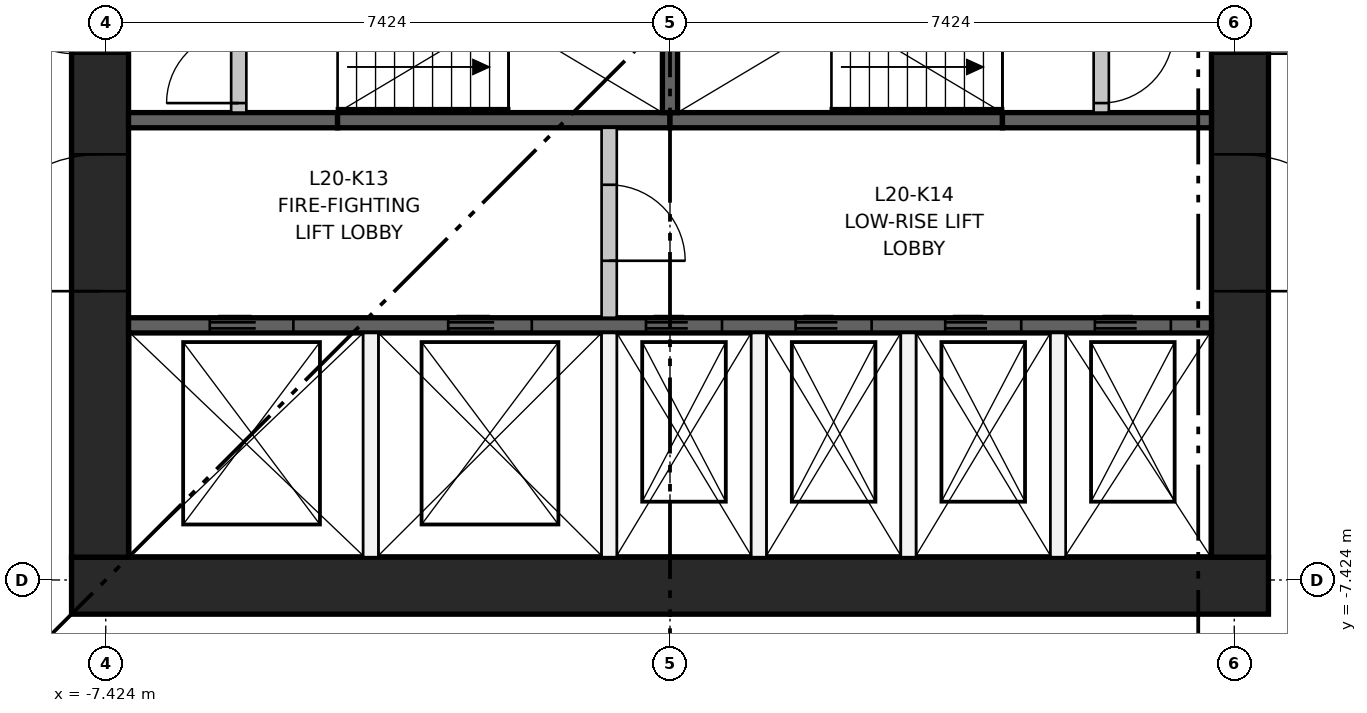
"""IFC4 building model, lengths in metres.
Left out: names, types, materials, properties, quantities, classifications, styles, units other than length and angle.
Written with IfcOpenShell. Run it as: python <this file> out.ifc"""

import sys

from ifc_helpers import new_model, si_unit, direction, frame, frame_2d, origin, place, context, subcontext, project, spatial, rectangle, extrude, element, fill, save


model = new_model("IFC4")
c1 = context("Model", 3, precision=1e-05, world=origin(), true_north=direction((0.0, 1.0)))
c2 = subcontext(c1, "Body", "Model", "MODEL_VIEW")
j1 = project(units=[si_unit("LENGTHUNIT", "METRE"), si_unit("PLANEANGLEUNIT", "RADIAN")], contexts=[c1])
p1 = place(None, origin())
s1 = spatial("IfcSite", under=j1, at=p1, CompositionType="ELEMENT")
p2 = place(p1, origin())
s2 = spatial("IfcBuilding", under=s1, at=p2, CompositionType="ELEMENT")
p3 = place(p2, frame((0.0, 0.0, 80.05)))
s3 = spatial("IfcBuildingStorey", under=s2, at=p3, CompositionType="ELEMENT", Elevation=80.05)
p4 = place(p3, frame((-7.874, -7.499, 0.0), z_axis=(0.0, 0.0, 1.0), x_axis=(1.0, 0.0, 0.0)))
e1 = element("IfcWall", 1, at=p4, inside=s3, PredefinedType="SHEAR", context=c2, shape_type="SweptSolid", body=[
    extrude(rectangle(XDim=15.748, YDim=0.75, at=frame_2d((7.874, 0.0))), origin(), (0.0, 0.0, 1.0), 3.65),
])
p5 = place(p3, frame((-7.499, -7.124, 0.0), z_axis=(0.0, 0.0, 1.0), x_axis=(0.0, 1.0, 0.0)))
e2 = element("IfcWall", 2, at=p5, inside=s3, PredefinedType="SHEAR", context=c2, shape_type="SweptSolid", body=[
    extrude(rectangle(XDim=14.248, YDim=0.75, at=frame_2d((7.124, 0.0))), origin(), (0.0, 0.0, 1.0), 3.65),
])
p6 = place(p5, frame((6.624, 0.0, 0.0)))
e3 = element("IfcOpeningElement", 3, at=p6, cuts=e2, PredefinedType="OPENING", context=c2, shape_type="SweptSolid", body=[
    extrude(rectangle(XDim=1.0, YDim=2.1, at=frame_2d((0.5, 1.05))), frame((0.0, 0.385, 0.0), z_axis=(0.0, -1.0, 0.0), x_axis=(1.0, 0.0, 0.0)), (0.0, 0.0, 1.0), 0.77),
])
p7 = place(p5, frame((3.5, 0.0, 0.0)))
e4 = element("IfcOpeningElement", 4, at=p7, cuts=e2, PredefinedType="OPENING", context=c2, shape_type="SweptSolid", body=[
    extrude(rectangle(XDim=1.8, YDim=2.1, at=frame_2d((0.9, 1.05))), frame((0.0, 0.385, 0.0), z_axis=(0.0, -1.0, 0.0), x_axis=(1.0, 0.0, 0.0)), (0.0, 0.0, 1.0), 0.77),
])
p8 = place(p5, frame((8.948, 0.0, 0.0)))
e5 = element("IfcOpeningElement", 5, at=p8, cuts=e2, PredefinedType="OPENING", context=c2, shape_type="SweptSolid", body=[
    extrude(rectangle(XDim=1.8, YDim=2.1, at=frame_2d((0.9, 1.05))), frame((0.0, 0.385, 0.0), z_axis=(0.0, -1.0, 0.0), x_axis=(1.0, 0.0, 0.0)), (0.0, 0.0, 1.0), 0.77),
])
p9 = place(p5, frame((12.124, 0.0, 0.0)))
e6 = element("IfcOpeningElement", 6, at=p9, cuts=e2, PredefinedType="OPENING", context=c2, shape_type="SweptSolid", body=[
    extrude(rectangle(XDim=1.0, YDim=2.1, at=frame_2d((0.5, 1.05))), frame((0.0, 0.385, 0.0), z_axis=(0.0, -1.0, 0.0), x_axis=(1.0, 0.0, 0.0)), (0.0, 0.0, 1.0), 0.77),
])
p10 = place(p3, frame((7.499, -7.124, 0.0), z_axis=(0.0, 0.0, 1.0), x_axis=(0.0, 1.0, 0.0)))
e7 = element("IfcWall", 7, at=p10, inside=s3, PredefinedType="SHEAR", context=c2, shape_type="SweptSolid", body=[
    extrude(rectangle(XDim=14.248, YDim=0.75, at=frame_2d((7.124, 0.0))), origin(), (0.0, 0.0, 1.0), 3.65),
])
p11 = place(p10, frame((6.624, 0.0, 0.0)))
e8 = element("IfcOpeningElement", 8, at=p11, cuts=e7, PredefinedType="OPENING", context=c2, shape_type="SweptSolid", body=[
    extrude(rectangle(XDim=1.0, YDim=2.1, at=frame_2d((0.5, 1.05))), frame((0.0, 0.385, 0.0), z_axis=(0.0, -1.0, 0.0), x_axis=(1.0, 0.0, 0.0)), (0.0, 0.0, 1.0), 0.77),
])
p12 = place(p10, frame((3.5, 0.0, 0.0)))
e9 = element("IfcOpeningElement", 9, at=p12, cuts=e7, PredefinedType="OPENING", context=c2, shape_type="SweptSolid", body=[
    extrude(rectangle(XDim=1.8, YDim=2.1, at=frame_2d((0.9, 1.05))), frame((0.0, 0.385, 0.0), z_axis=(0.0, -1.0, 0.0), x_axis=(1.0, 0.0, 0.0)), (0.0, 0.0, 1.0), 0.77),
])
p13 = place(p10, frame((8.948, 0.0, 0.0)))
e10 = element("IfcOpeningElement", 10, at=p13, cuts=e7, PredefinedType="OPENING", context=c2, shape_type="SweptSolid", body=[
    extrude(rectangle(XDim=1.8, YDim=2.1, at=frame_2d((0.9, 1.05))), frame((0.0, 0.385, 0.0), z_axis=(0.0, -1.0, 0.0), x_axis=(1.0, 0.0, 0.0)), (0.0, 0.0, 1.0), 0.77),
])
p14 = place(p3, frame((-7.124, -4.074, 0.0), z_axis=(0.0, 0.0, 1.0), x_axis=(1.0, 0.0, 0.0)))
e11 = element("IfcWall", 11, at=p14, inside=s3, PredefinedType="SHEAR", context=c2, shape_type="SweptSolid", body=[
    extrude(rectangle(XDim=14.248, YDim=0.2, at=frame_2d((7.124, 0.0))), origin(), (0.0, 0.0, 1.0), 3.3),
])
p15 = place(p14, frame((1.069, 0.0, 0.0)))
e12 = element("IfcOpeningElement", 12, at=p15, cuts=e11, PredefinedType="OPENING", context=c2, shape_type="SweptSolid", body=[
    extrude(rectangle(XDim=1.1, YDim=2.1, at=frame_2d((0.55, 1.05))), frame((0.0, 0.11, 0.0), z_axis=(0.0, -1.0, 0.0), x_axis=(1.0, 0.0, 0.0)), (0.0, 0.0, 1.0), 0.22),
])
p16 = place(p14, frame((4.206, 0.0, 0.0)))
e13 = element("IfcOpeningElement", 13, at=p16, cuts=e11, PredefinedType="OPENING", context=c2, shape_type="SweptSolid", body=[
    extrude(rectangle(XDim=1.1, YDim=2.1, at=frame_2d((0.55, 1.05))), frame((0.0, 0.11, 0.0), z_axis=(0.0, -1.0, 0.0), x_axis=(1.0, 0.0, 0.0)), (0.0, 0.0, 1.0), 0.22),
])
p17 = place(p14, frame((6.808, 0.0, 0.0)))
e14 = element("IfcOpeningElement", 14, at=p17, cuts=e11, PredefinedType="OPENING", context=c2, shape_type="SweptSolid", body=[
    extrude(rectangle(XDim=1.0, YDim=2.1, at=frame_2d((0.5, 1.05))), frame((0.0, 0.11, 0.0), z_axis=(0.0, -1.0, 0.0), x_axis=(1.0, 0.0, 0.0)), (0.0, 0.0, 1.0), 0.22),
])
p18 = place(p14, frame((8.777, 0.0, 0.0)))
e15 = element("IfcOpeningElement", 15, at=p18, cuts=e11, PredefinedType="OPENING", context=c2, shape_type="SweptSolid", body=[
    extrude(rectangle(XDim=1.0, YDim=2.1, at=frame_2d((0.5, 1.05))), frame((0.0, 0.11, 0.0), z_axis=(0.0, -1.0, 0.0), x_axis=(1.0, 0.0, 0.0)), (0.0, 0.0, 1.0), 0.22),
])
p19 = place(p14, frame((10.745, 0.0, 0.0)))
e16 = element("IfcOpeningElement", 16, at=p19, cuts=e11, PredefinedType="OPENING", context=c2, shape_type="SweptSolid", body=[
    extrude(rectangle(XDim=1.0, YDim=2.1, at=frame_2d((0.5, 1.05))), frame((0.0, 0.11, 0.0), z_axis=(0.0, -1.0, 0.0), x_axis=(1.0, 0.0, 0.0)), (0.0, 0.0, 1.0), 0.22),
])
p20 = place(p14, frame((12.714, 0.0, 0.0)))
e17 = element("IfcOpeningElement", 17, at=p20, cuts=e11, PredefinedType="OPENING", context=c2, shape_type="SweptSolid", body=[
    extrude(rectangle(XDim=1.0, YDim=2.1, at=frame_2d((0.5, 1.05))), frame((0.0, 0.11, 0.0), z_axis=(0.0, -1.0, 0.0), x_axis=(1.0, 0.0, 0.0)), (0.0, 0.0, 1.0), 0.22),
])
p21 = place(p3, frame((-7.124, -1.375, 0.0), z_axis=(0.0, 0.0, 1.0), x_axis=(1.0, 0.0, 0.0)))
e18 = element("IfcWall", 18, at=p21, inside=s3, PredefinedType="SHEAR", context=c2, shape_type="SweptSolid", body=[
    extrude(rectangle(XDim=2.75, YDim=0.2, at=frame_2d((1.375, 0.0))), origin(), (0.0, 0.0, 1.0), 3.3),
])
for number, where, z_axis, x_axis in (
    (19, (-4.374, -1.375, 0.0), (0.0, 0.0, 1.0), (1.0, 0.0, 0.0)),
    (20, (0.0, -1.375, 0.0), (0.0, 0.0, 1.0), (1.0, 0.0, 0.0)),
):
    element("IfcWall", number, at=place(p3, frame(where, z_axis=z_axis, x_axis=x_axis)), inside=s3, PredefinedType="SHEAR", context=c2, shape_type="SweptSolid", body=[
        extrude(rectangle(XDim=4.374, YDim=0.2, at=frame_2d((2.187, 0.0))), origin(), (0.0, 0.0, 1.0), 3.3),
    ])
p22 = place(p3, frame((4.374, -1.375, 0.0), z_axis=(0.0, 0.0, 1.0), x_axis=(1.0, 0.0, 0.0)))
e21 = element("IfcWall", 21, at=p22, inside=s3, PredefinedType="SHEAR", context=c2, shape_type="SweptSolid", body=[
    extrude(rectangle(XDim=2.75, YDim=0.2, at=frame_2d((1.375, 0.0))), origin(), (0.0, 0.0, 1.0), 3.3),
])
p23 = place(p3, frame((0.0, -1.275, 0.0), z_axis=(0.0, 0.0, 1.0), x_axis=(0.0, 1.0, 0.0)))
e22 = element("IfcWall", 22, at=p23, inside=s3, PredefinedType="SHEAR", context=c2, shape_type="SweptSolid", body=[
    extrude(rectangle(XDim=2.55, YDim=0.2, at=frame_2d((1.275, 0.0))), origin(), (0.0, 0.0, 1.0), 3.3),
])
for number, where, z_axis, x_axis in (
    (23, (-3.937, -7.124, 0.0), (0.0, 0.0, 1.0), (0.0, 1.0, 0.0)),
    (24, (-0.8, -7.124, 0.0), (0.0, 0.0, 1.0), (0.0, 1.0, 0.0)),
):
    element("IfcWall", number, at=place(p3, frame(where, z_axis=z_axis, x_axis=x_axis)), inside=s3, PredefinedType="PARTITIONING", context=c2, shape_type="SweptSolid", body=[
        extrude(rectangle(XDim=2.95, YDim=0.2, at=frame_2d((1.475, 0.0))), origin(), (0.0, 0.0, 1.0), 3.3),
    ])
p24 = place(p3, frame((-0.8, -3.974, 0.0), z_axis=(0.0, 0.0, 1.0), x_axis=(0.0, 1.0, 0.0)))
e25 = element("IfcWall", 25, at=p24, inside=s3, PredefinedType="PARTITIONING", context=c2, shape_type="SweptSolid", body=[
    extrude(rectangle(XDim=2.499, YDim=0.2, at=frame_2d((1.25, 0.0))), origin(), (0.0, 0.0, 1.0), 3.3),
])
p25 = place(p24, frame((0.75, 0.0, 0.0)))
e26 = element("IfcOpeningElement", 26, at=p25, cuts=e25, PredefinedType="OPENING", context=c2, shape_type="SweptSolid", body=[
    extrude(rectangle(XDim=1.0, YDim=2.1, at=frame_2d((0.5, 1.05))), frame((0.0, 0.11, 0.0), z_axis=(0.0, -1.0, 0.0), x_axis=(1.0, 0.0, 0.0)), (0.0, 0.0, 1.0), 0.22),
])
for number, where, z_axis, x_axis in (
    (27, (1.168, -7.124, 0.0), (0.0, 0.0, 1.0), (0.0, 1.0, 0.0)),
    (28, (3.137, -7.124, 0.0), (0.0, 0.0, 1.0), (0.0, 1.0, 0.0)),
    (29, (5.105, -7.124, 0.0), (0.0, 0.0, 1.0), (0.0, 1.0, 0.0)),
):
    element("IfcWall", number, at=place(p3, frame(where, z_axis=z_axis, x_axis=x_axis)), inside=s3, PredefinedType="PARTITIONING", context=c2, shape_type="SweptSolid", body=[
        extrude(rectangle(XDim=2.95, YDim=0.2, at=frame_2d((1.475, 0.0))), origin(), (0.0, 0.0, 1.0), 3.3),
    ])
p26 = place(p3, frame((-5.674, -1.275, 0.0), z_axis=(0.0, 0.0, 1.0), x_axis=(0.0, 1.0, 0.0)))
e30 = element("IfcWall", 30, at=p26, inside=s3, PredefinedType="PARTITIONING", context=c2, shape_type="SweptSolid", body=[
    extrude(rectangle(XDim=2.55, YDim=0.2, at=frame_2d((1.275, 0.0))), origin(), (0.0, 0.0, 1.0), 3.3),
])
p27 = place(p26, frame((0.125, 0.0, 0.0)))
e31 = element("IfcOpeningElement", 31, at=p27, cuts=e30, PredefinedType="OPENING", context=c2, shape_type="SweptSolid", body=[
    extrude(rectangle(XDim=0.95, YDim=2.1, at=frame_2d((0.475, 1.05))), frame((0.0, 0.11, 0.0), z_axis=(0.0, -1.0, 0.0), x_axis=(1.0, 0.0, 0.0)), (0.0, 0.0, 1.0), 0.22),
])
p28 = place(p26, frame((1.475, 0.0, 0.0)))
e32 = element("IfcOpeningElement", 32, at=p28, cuts=e30, PredefinedType="OPENING", context=c2, shape_type="SweptSolid", body=[
    extrude(rectangle(XDim=0.95, YDim=2.1, at=frame_2d((0.475, 1.05))), frame((0.0, 0.11, 0.0), z_axis=(0.0, -1.0, 0.0), x_axis=(1.0, 0.0, 0.0)), (0.0, 0.0, 1.0), 0.22),
])
p29 = place(p3, frame((5.674, -1.275, 0.0), z_axis=(0.0, 0.0, 1.0), x_axis=(0.0, 1.0, 0.0)))
e33 = element("IfcWall", 33, at=p29, inside=s3, PredefinedType="PARTITIONING", context=c2, shape_type="SweptSolid", body=[
    extrude(rectangle(XDim=2.55, YDim=0.2, at=frame_2d((1.275, 0.0))), origin(), (0.0, 0.0, 1.0), 3.3),
])
p30 = place(p29, frame((0.125, 0.0, 0.0)))
e34 = element("IfcOpeningElement", 34, at=p30, cuts=e33, PredefinedType="OPENING", context=c2, shape_type="SweptSolid", body=[
    extrude(rectangle(XDim=0.95, YDim=2.1, at=frame_2d((0.475, 1.05))), frame((0.0, 0.11, 0.0), z_axis=(0.0, -1.0, 0.0), x_axis=(1.0, 0.0, 0.0)), (0.0, 0.0, 1.0), 0.22),
])
p31 = place(p29, frame((1.475, 0.0, 0.0)))
e35 = element("IfcOpeningElement", 35, at=p31, cuts=e33, PredefinedType="OPENING", context=c2, shape_type="SweptSolid", body=[
    extrude(rectangle(XDim=0.95, YDim=2.1, at=frame_2d((0.475, 1.05))), frame((0.0, 0.11, 0.0), z_axis=(0.0, -1.0, 0.0), x_axis=(1.0, 0.0, 0.0)), (0.0, 0.0, 1.0), 0.22),
])
p32 = place(p15, origin())
e36 = element("IfcDoor", 36, at=p32, inside=s3, OperationType="DOUBLE_DOOR_SLIDING", PredefinedType="DOOR", context=c2, shape_type="SweptSolid", body=[
    extrude(rectangle(XDim=1.1, YDim=2.1, at=frame_2d((0.55, 1.05))), frame((0.0, 0.025, 0.0), z_axis=(0.0, -1.0, 0.0), x_axis=(1.0, 0.0, 0.0)), (0.0, 0.0, 1.0), 0.05),
])
fill(e12, e36)
p33 = place(p16, origin())
e37 = element("IfcDoor", 37, at=p33, inside=s3, OperationType="DOUBLE_DOOR_SLIDING", PredefinedType="DOOR", context=c2, shape_type="SweptSolid", body=[
    extrude(rectangle(XDim=1.1, YDim=2.1, at=frame_2d((0.55, 1.05))), frame((0.0, 0.025, 0.0), z_axis=(0.0, -1.0, 0.0), x_axis=(1.0, 0.0, 0.0)), (0.0, 0.0, 1.0), 0.05),
])
fill(e13, e37)
p34 = place(p17, origin())
e38 = element("IfcDoor", 38, at=p34, inside=s3, OperationType="DOUBLE_DOOR_SLIDING", PredefinedType="DOOR", context=c2, shape_type="SweptSolid", body=[
    extrude(rectangle(XDim=1.0, YDim=2.1, at=frame_2d((0.5, 1.05))), frame((0.0, 0.025, 0.0), z_axis=(0.0, -1.0, 0.0), x_axis=(1.0, 0.0, 0.0)), (0.0, 0.0, 1.0), 0.05),
])
fill(e14, e38)
p35 = place(p18, origin())
e39 = element("IfcDoor", 39, at=p35, inside=s3, OperationType="DOUBLE_DOOR_SLIDING", PredefinedType="DOOR", context=c2, shape_type="SweptSolid", body=[
    extrude(rectangle(XDim=1.0, YDim=2.1, at=frame_2d((0.5, 1.05))), frame((0.0, 0.025, 0.0), z_axis=(0.0, -1.0, 0.0), x_axis=(1.0, 0.0, 0.0)), (0.0, 0.0, 1.0), 0.05),
])
fill(e15, e39)
p36 = place(p19, origin())
e40 = element("IfcDoor", 40, at=p36, inside=s3, OperationType="DOUBLE_DOOR_SLIDING", PredefinedType="DOOR", context=c2, shape_type="SweptSolid", body=[
    extrude(rectangle(XDim=1.0, YDim=2.1, at=frame_2d((0.5, 1.05))), frame((0.0, 0.025, 0.0), z_axis=(0.0, -1.0, 0.0), x_axis=(1.0, 0.0, 0.0)), (0.0, 0.0, 1.0), 0.05),
])
fill(e16, e40)
p37 = place(p20, origin())
e41 = element("IfcDoor", 41, at=p37, inside=s3, OperationType="DOUBLE_DOOR_SLIDING", PredefinedType="DOOR", context=c2, shape_type="SweptSolid", body=[
    extrude(rectangle(XDim=1.0, YDim=2.1, at=frame_2d((0.5, 1.05))), frame((0.0, 0.025, 0.0), z_axis=(0.0, -1.0, 0.0), x_axis=(1.0, 0.0, 0.0)), (0.0, 0.0, 1.0), 0.05),
])
fill(e17, e41)
p38 = place(p27, origin())
e42 = element("IfcDoor", 42, at=p38, inside=s3, OperationType="SINGLE_SWING_LEFT", PredefinedType="DOOR", context=c2, shape_type="SweptSolid", body=[
    extrude(rectangle(XDim=0.95, YDim=2.1, at=frame_2d((0.475, 1.05))), frame((0.0, 0.025, 0.0), z_axis=(0.0, -1.0, 0.0), x_axis=(1.0, 0.0, 0.0)), (0.0, 0.0, 1.0), 0.05),
])
fill(e31, e42)
p39 = place(p30, frame((0.95, 0.0, 0.0), z_axis=(0.0, 0.0, 1.0), x_axis=(-1.0, 0.0, 0.0)))
e43 = element("IfcDoor", 43, at=p39, inside=s3, OperationType="SINGLE_SWING_RIGHT", PredefinedType="DOOR", context=c2, shape_type="SweptSolid", body=[
    extrude(rectangle(XDim=0.95, YDim=2.1, at=frame_2d((0.475, 1.05))), frame((0.0, 0.025, 0.0), z_axis=(0.0, -1.0, 0.0), x_axis=(1.0, 0.0, 0.0)), (0.0, 0.0, 1.0), 0.05),
])
fill(e34, e43)
p40 = place(p25, frame((1.0, 0.0, 0.0), z_axis=(0.0, 0.0, 1.0), x_axis=(-1.0, 0.0, 0.0)))
e44 = element("IfcDoor", 44, at=p40, inside=s3, OperationType="SINGLE_SWING_LEFT", PredefinedType="DOOR", context=c2, shape_type="SweptSolid", body=[
    extrude(rectangle(XDim=1.0, YDim=2.1, at=frame_2d((0.5, 1.05))), frame((0.0, 0.025, 0.0), z_axis=(0.0, -1.0, 0.0), x_axis=(1.0, 0.0, 0.0)), (0.0, 0.0, 1.0), 0.05),
])
fill(e26, e44)
p41 = place(p6, origin())
e45 = element("IfcDoor", 45, at=p41, inside=s3, OperationType="SINGLE_SWING_RIGHT", PredefinedType="DOOR", context=c2, shape_type="SweptSolid", body=[
    extrude(rectangle(XDim=1.0, YDim=2.1, at=frame_2d((0.5, 1.05))), frame((0.0, 0.375, 0.0), z_axis=(0.0, -1.0, 0.0), x_axis=(1.0, 0.0, 0.0)), (0.0, 0.0, 1.0), 0.05),
])
fill(e3, e45)
p42 = place(p7, origin())
e46 = element("IfcDoor", 46, at=p42, inside=s3, OperationType="DOUBLE_DOOR_SINGLE_SWING", PredefinedType="DOOR", context=c2, shape_type="SweptSolid", body=[
    extrude(rectangle(XDim=1.8, YDim=2.1, at=frame_2d((0.9, 1.05))), frame((0.0, 0.025, 0.0), z_axis=(0.0, -1.0, 0.0), x_axis=(1.0, 0.0, 0.0)), (0.0, 0.0, 1.0), 0.05),
])
fill(e4, e46)
p43 = place(p11, frame((1.0, 0.0, 0.0), z_axis=(0.0, 0.0, 1.0), x_axis=(-1.0, 0.0, 0.0)))
e47 = element("IfcDoor", 47, at=p43, inside=s3, OperationType="SINGLE_SWING_LEFT", PredefinedType="DOOR", context=c2, shape_type="SweptSolid", body=[
    extrude(rectangle(XDim=1.0, YDim=2.1, at=frame_2d((0.5, 1.05))), frame((0.0, 0.375, 0.0), z_axis=(0.0, -1.0, 0.0), x_axis=(1.0, 0.0, 0.0)), (0.0, 0.0, 1.0), 0.05),
])
fill(e8, e47)
p44 = place(p12, frame((1.8, 0.0, 0.0), z_axis=(0.0, 0.0, 1.0), x_axis=(-1.0, 0.0, 0.0)))
e48 = element("IfcDoor", 48, at=p44, inside=s3, OperationType="DOUBLE_DOOR_SINGLE_SWING", PredefinedType="DOOR", context=c2, shape_type="SweptSolid", body=[
    extrude(rectangle(XDim=1.8, YDim=2.1, at=frame_2d((0.9, 1.05))), frame((0.0, 0.025, 0.0), z_axis=(0.0, -1.0, 0.0), x_axis=(1.0, 0.0, 0.0)), (0.0, 0.0, 1.0), 0.05),
])
fill(e9, e48)
save(model, sys.argv[1])
